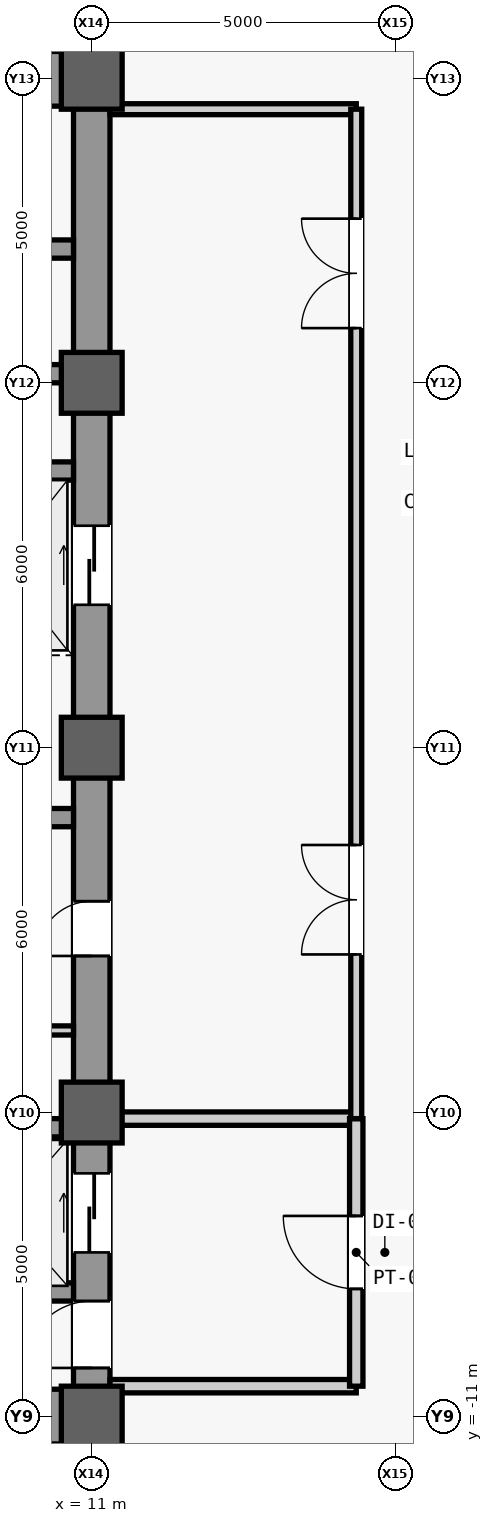
"""IFC4 building model, lengths in metres.
Left out: names, types, materials, properties, quantities, classifications, styles, units other than length and angle.
Written with IfcOpenShell. Run it as: python <this file> out.ifc"""

import sys

from ifc_helpers import new_model, si_unit, direction, frame, frame_2d, origin, origin_2d, place, context, subcontext, project, spatial, rectangle, extrude, source, transform, mapped, element, fill, save


model = new_model("IFC4")
c1 = context("Model", 3, precision=1e-05, world=origin(), true_north=direction((0.0, 1.0)))
c2 = subcontext(c1, "Body", "Model", "MODEL_VIEW")
j1 = project(units=[si_unit("LENGTHUNIT", "METRE"), si_unit("PLANEANGLEUNIT", "RADIAN")], contexts=[c1])
p1 = place(None, origin())
s1 = spatial("IfcSite", under=j1, at=p1, CompositionType="ELEMENT")
p2 = place(p1, origin())
s2 = spatial("IfcBuilding", under=s1, at=p2, CompositionType="ELEMENT")
p3 = place(p2, frame((0.0, 0.0, 70.4)))
s3 = spatial("IfcBuildingStorey", under=s2, at=p3, CompositionType="ELEMENT", Elevation=70.4)
m1 = source(origin(), c2, "Body", "SweptSolid", [
    extrude(rectangle(XDim=22.0, YDim=0.6, at=frame_2d((11.0, 0.0))), origin(), (0.0, 0.0, 1.0), 3.94),
])
p4 = place(p3, frame((11.0, -11.0, 0.0), z_axis=(0.0, 0.0, 1.0), x_axis=(0.0, 1.0, 0.0)))
e1 = element("IfcWall", 1, at=p4, inside=s3, PredefinedType="SHEAR", context=c2, shape_type="MappedRepresentation", body=[
    mapped(m1, transform((0.0, 0.0, 0.0), scale=1.0)),
])
m2 = source(origin(), c2, "Body", "SweptSolid", [
    extrude(rectangle(XDim=1.1, YDim=2.2, at=frame_2d((0.55, 1.1))), frame((0.0, 0.31, 0.0), z_axis=(0.0, -1.0, 0.0), x_axis=(1.0, 0.0, 0.0)), (0.0, 0.0, 1.0), 0.62),
])
p5 = place(p4, frame((0.8, 0.0, 0.0)))
e2 = element("IfcOpeningElement", 2, at=p5, cuts=e1, PredefinedType="OPENING", context=c2, shape_type="MappedRepresentation", body=[
    mapped(m2, transform((0.0, 0.0, 0.0), scale=1.0)),
])
m3 = source(origin(), c2, "Body", "SweptSolid", [
    extrude(rectangle(XDim=0.9, YDim=2.15, at=frame_2d((0.45, 1.075))), frame((0.0, 0.31, 0.0), z_axis=(0.0, -1.0, 0.0), x_axis=(1.0, 0.0, 0.0)), (0.0, 0.0, 1.0), 0.62),
])
p6 = place(p4, frame((7.575, 0.0, 0.0)))
e3 = element("IfcOpeningElement", 3, at=p6, cuts=e1, PredefinedType="OPENING", context=c2, shape_type="MappedRepresentation", body=[
    mapped(m3, transform((0.0, 0.0, 0.0), scale=1.0)),
])
m4 = source(origin(), c2, "Body", "SweptSolid", [
    extrude(rectangle(XDim=1.3, YDim=2.3, at=frame_2d((0.65, 1.15))), frame((0.0, 0.31, 0.0), z_axis=(0.0, -1.0, 0.0), x_axis=(1.0, 0.0, 0.0)), (0.0, 0.0, 1.0), 0.62),
])
p7 = place(p4, frame((2.7, 0.0, 0.0)))
e4 = element("IfcOpeningElement", 4, at=p7, cuts=e1, PredefinedType="OPENING", context=c2, shape_type="MappedRepresentation", body=[
    mapped(m4, transform((0.0, 0.0, 0.0), scale=1.0)),
])
p8 = place(p4, frame((13.35, 0.0, 0.0)))
e5 = element("IfcOpeningElement", 5, at=p8, cuts=e1, PredefinedType="OPENING", context=c2, shape_type="MappedRepresentation", body=[
    mapped(m4, transform((0.0, 0.0, 0.0), scale=1.0)),
])
m5 = source(origin(), c2, "Body", "SweptSolid", [
    extrude(rectangle(XDim=5.85, YDim=0.9, at=frame_2d((2.925, 0.0))), origin(), (0.0, 0.0, 1.0), 3.94),
])
p9 = place(p3, frame((4.85, -11.0, 0.0), z_axis=(0.0, 0.0, 1.0), x_axis=(1.0, 0.0, 0.0)))
e6 = element("IfcWall", 6, at=p9, inside=s3, PredefinedType="SHEAR", context=c2, shape_type="MappedRepresentation", body=[
    mapped(m5, transform((0.0, 0.0, 0.0), scale=1.0)),
])
p10 = place(p3, frame((4.85, 11.0, 0.0), z_axis=(0.0, 0.0, 1.0), x_axis=(1.0, 0.0, 0.0)))
e7 = element("IfcWall", 7, at=p10, inside=s3, PredefinedType="SHEAR", context=c2, shape_type="MappedRepresentation", body=[
    mapped(m5, transform((0.0, 0.0, 0.0), scale=1.0)),
])
m6 = source(origin(), c2, "Body", "SweptSolid", [
    extrude(rectangle(XDim=0.9, YDim=2.15, at=frame_2d((0.45, 1.075))), frame((0.0, 0.46, 0.0), z_axis=(0.0, -1.0, 0.0), x_axis=(1.0, 0.0, 0.0)), (0.0, 0.0, 1.0), 0.92),
])
p11 = place(p10, frame((0.5, 0.0, 0.0)))
e8 = element("IfcOpeningElement", 8, at=p11, cuts=e7, PredefinedType="OPENING", context=c2, shape_type="MappedRepresentation", body=[
    mapped(m6, transform((0.0, 0.0, 0.0), scale=1.0)),
])
m7 = source(origin(), c2, "Body", "SweptSolid", [
    extrude(rectangle(XDim=5.6, YDim=0.3, at=frame_2d((2.8, 0.0))), origin(), (0.0, 0.0, 1.0), 3.94),
])
p12 = place(p3, frame((5.1, -1.15, 0.0), z_axis=(0.0, 0.0, 1.0), x_axis=(1.0, 0.0, 0.0)))
e9 = element("IfcWall", 9, at=p12, inside=s3, PredefinedType="SHEAR", context=c2, shape_type="MappedRepresentation", body=[
    mapped(m7, transform((0.0, 0.0, 0.0), scale=1.0)),
])
m8 = source(origin(), c2, "Body", "SweptSolid", [
    extrude(rectangle(XDim=1.0, YDim=1.0, at=origin_2d()), origin(), (0.0, 0.0, 1.0), 4.2),
])
for number, where, z_axis, x_axis in (
    (10, (11.0, -11.0, 0.0), (0.0, 0.0, 1.0), (1.0, 0.0, 0.0)),
    (11, (11.0, -6.0, 0.0), (0.0, 0.0, 1.0), (1.0, 0.0, 0.0)),
    (12, (11.0, 0.0, 0.0), (0.0, 0.0, 1.0), (1.0, 0.0, 0.0)),
    (13, (11.0, 6.0, 0.0), (0.0, 0.0, 1.0), (1.0, 0.0, 0.0)),
    (14, (11.0, 11.0, 0.0), (0.0, 0.0, 1.0), (1.0, 0.0, 0.0)),
):
    element("IfcColumn", number, at=place(p3, frame(where, z_axis=z_axis, x_axis=x_axis)), inside=s3, PredefinedType="COLUMN", context=c2, shape_type="MappedRepresentation", body=[
        mapped(m8, transform((0.0, 0.0, 0.0), scale=1.0)),
    ])
m9 = source(origin(), c2, "Body", "SweptSolid", [
    extrude(rectangle(XDim=2.2, YDim=0.3, at=frame_2d((1.1, 0.0))), origin(), (0.0, 0.0, 1.0), 3.94),
])
for number, where, z_axis, x_axis in (
    (15, (8.5, -8.95, 0.0), (0.0, 0.0, 1.0), (1.0, 0.0, 0.0)),
    (16, (8.5, -6.25, 0.0), (0.0, 0.0, 1.0), (1.0, 0.0, 0.0)),
):
    element("IfcWall", number, at=place(p3, frame(where, z_axis=z_axis, x_axis=x_axis)), inside=s3, PredefinedType="SHEAR", context=c2, shape_type="MappedRepresentation", body=[
        mapped(m9, transform((0.0, 0.0, 0.0), scale=1.0)),
    ])
m10 = source(origin(), c2, "Body", "SweptSolid", [
    extrude(rectangle(XDim=2.3, YDim=0.3, at=frame_2d((1.15, 0.0))), origin(), (0.0, 0.0, 1.0), 3.94),
])
for number, where, z_axis, x_axis in (
    (17, (8.4, 4.55, 0.0), (0.0, 0.0, 1.0), (1.0, 0.0, 0.0)),
    (18, (8.4, 6.15, 0.0), (0.0, 0.0, 1.0), (1.0, 0.0, 0.0)),
    (19, (8.4, 8.2, 0.0), (0.0, 0.0, 1.0), (1.0, 0.0, 0.0)),
):
    element("IfcWall", number, at=place(p3, frame(where, z_axis=z_axis, x_axis=x_axis)), inside=s3, PredefinedType="SHEAR", context=c2, shape_type="MappedRepresentation", body=[
        mapped(m10, transform((0.0, 0.0, 0.0), scale=1.0)),
    ])
m11 = source(origin(), c2, "Body", "SweptSolid", [
    extrude(rectangle(XDim=2.05, YDim=0.15, at=frame_2d((1.025, 0.0))), origin(), (0.0, 0.0, 1.0), 3.94),
])
p13 = place(p3, frame((8.65, -4.65, 0.0), z_axis=(0.0, 0.0, 1.0), x_axis=(1.0, 0.0, 0.0)))
e20 = element("IfcWall", 20, at=p13, inside=s3, PredefinedType="PARTITIONING", context=c2, shape_type="MappedRepresentation", body=[
    mapped(m11, transform((0.0, 0.0, 0.0), scale=1.0)),
])
m12 = source(origin(), c2, "Body", "SweptSolid", [
    extrude(rectangle(XDim=4.05, YDim=0.22, at=frame_2d((2.025, 0.0))), origin(), (0.0, 0.0, 1.0), 3.94),
])
p14 = place(p3, frame((11.3, -10.5, 0.0), z_axis=(0.0, 0.0, 1.0), x_axis=(1.0, 0.0, 0.0)))
e21 = element("IfcWall", 21, at=p14, inside=s3, PredefinedType="PARTITIONING", context=c2, shape_type="MappedRepresentation", body=[
    mapped(m12, transform((0.0, 0.0, 0.0), scale=1.0)),
])
m13 = source(origin(), c2, "Body", "SweptSolid", [
    extrude(rectangle(XDim=4.05, YDim=0.22, at=frame_2d((2.025, 0.0))), origin(), (0.0, 0.0, 1.0), 3.085),
])
p15 = place(p3, frame((11.3, -6.1, 0.0), z_axis=(0.0, 0.0, 1.0), x_axis=(1.0, 0.0, 0.0)))
e22 = element("IfcWall", 22, at=p15, inside=s3, PredefinedType="PARTITIONING", context=c2, shape_type="MappedRepresentation", body=[
    mapped(m13, transform((0.0, 0.0, 0.0), scale=1.0)),
])
m14 = source(origin(), c2, "Body", "SweptSolid", [
    extrude(rectangle(XDim=4.4, YDim=0.22, at=frame_2d((2.2, 0.0))), origin(), (0.0, 0.0, 1.0), 3.94),
])
p16 = place(p3, frame((15.35, -10.5, 0.0), z_axis=(0.0, 0.0, 1.0), x_axis=(0.0, 1.0, 0.0)))
e23 = element("IfcWall", 23, at=p16, inside=s3, PredefinedType="PARTITIONING", context=c2, shape_type="MappedRepresentation", body=[
    mapped(m14, transform((0.0, 0.0, 0.0), scale=1.0)),
])
m15 = source(origin(), c2, "Body", "SweptSolid", [
    extrude(rectangle(XDim=1.2, YDim=2.2, at=frame_2d((0.6, 1.1))), frame((0.0, 0.12, 0.0), z_axis=(0.0, -1.0, 0.0), x_axis=(1.0, 0.0, 0.0)), (0.0, 0.0, 1.0), 0.24),
])
p17 = place(p16, frame((1.6, 0.0, 0.0)))
e24 = element("IfcOpeningElement", 24, at=p17, cuts=e23, PredefinedType="OPENING", context=c2, shape_type="MappedRepresentation", body=[
    mapped(m15, transform((0.0, 0.0, 0.0), scale=1.0)),
])
m16 = source(origin(), c2, "Body", "SweptSolid", [
    extrude(rectangle(XDim=4.05, YDim=0.18, at=frame_2d((2.025, 0.0))), origin(), (0.0, 0.0, 1.0), 3.94),
])
p18 = place(p3, frame((11.3, 10.5, 0.0), z_axis=(0.0, 0.0, 1.0), x_axis=(1.0, 0.0, 0.0)))
e25 = element("IfcWall", 25, at=p18, inside=s3, PredefinedType="PARTITIONING", context=c2, shape_type="MappedRepresentation", body=[
    mapped(m16, transform((0.0, 0.0, 0.0), scale=1.0)),
])
m17 = source(origin(), c2, "Body", "SweptSolid", [
    extrude(rectangle(XDim=16.6, YDim=0.18, at=frame_2d((8.3, 0.0))), origin(), (0.0, 0.0, 1.0), 3.94),
])
p19 = place(p3, frame((15.35, -6.1, 0.0), z_axis=(0.0, 0.0, 1.0), x_axis=(0.0, 1.0, 0.0)))
e26 = element("IfcWall", 26, at=p19, inside=s3, PredefinedType="PARTITIONING", context=c2, shape_type="MappedRepresentation", body=[
    mapped(m17, transform((0.0, 0.0, 0.0), scale=1.0)),
])
m18 = source(origin(), c2, "Body", "SweptSolid", [
    extrude(rectangle(XDim=1.8, YDim=2.25, at=frame_2d((0.9, 1.125))), frame((0.0, 0.1, 0.0), z_axis=(0.0, -1.0, 0.0), x_axis=(1.0, 0.0, 0.0)), (0.0, 0.0, 1.0), 0.2),
])
p20 = place(p19, frame((2.7, 0.0, 0.0)))
e27 = element("IfcOpeningElement", 27, at=p20, cuts=e26, PredefinedType="OPENING", context=c2, shape_type="MappedRepresentation", body=[
    mapped(m18, transform((0.0, 0.0, 0.0), scale=1.0)),
])
p21 = place(p19, frame((13.0, 0.0, 0.0)))
e28 = element("IfcOpeningElement", 28, at=p21, cuts=e26, PredefinedType="OPENING", context=c2, shape_type="MappedRepresentation", body=[
    mapped(m18, transform((0.0, 0.0, 0.0), scale=1.0)),
])
m19 = source(origin(), c2, "Body", "SweptSolid", [
    extrude(rectangle(XDim=1.1, YDim=2.2, at=frame_2d((0.55, 1.1))), frame((0.0, 0.025, 0.0), z_axis=(0.0, -1.0, 0.0), x_axis=(1.0, 0.0, 0.0)), (0.0, 0.0, 1.0), 0.05),
])
p22 = place(p5, origin())
e29 = element("IfcDoor", 29, at=p22, inside=s3, OperationType="SINGLE_SWING_LEFT", PredefinedType="DOOR", context=c2, shape_type="MappedRepresentation", body=[
    mapped(m19, transform((0.0, 0.0, 0.0), scale=1.0)),
])
fill(e2, e29)
m20 = source(origin(), c2, "Body", "SweptSolid", [
    extrude(rectangle(XDim=0.9, YDim=2.15, at=frame_2d((0.45, 1.075))), frame((0.0, 0.025, 0.0), z_axis=(0.0, -1.0, 0.0), x_axis=(1.0, 0.0, 0.0)), (0.0, 0.0, 1.0), 0.05),
])
p23 = place(p6, origin())
e30 = element("IfcDoor", 30, at=p23, inside=s3, OperationType="SINGLE_SWING_LEFT", PredefinedType="DOOR", context=c2, shape_type="MappedRepresentation", body=[
    mapped(m20, transform((0.0, 0.0, 0.0), scale=1.0)),
])
fill(e3, e30)
m21 = source(origin(), c2, "Body", "SweptSolid", [
    extrude(rectangle(XDim=1.2, YDim=2.2, at=frame_2d((0.6, 1.1))), frame((0.0, 0.025, 0.0), z_axis=(0.0, -1.0, 0.0), x_axis=(1.0, 0.0, 0.0)), (0.0, 0.0, 1.0), 0.05),
])
p24 = place(p17, origin())
e31 = element("IfcDoor", 31, at=p24, inside=s3, OperationType="SINGLE_SWING_RIGHT", PredefinedType="DOOR", context=c2, shape_type="MappedRepresentation", body=[
    mapped(m21, transform((0.0, 0.0, 0.0), scale=1.0)),
])
fill(e24, e31)
m22 = source(origin(), c2, "Body", "SweptSolid", [
    extrude(rectangle(XDim=1.8, YDim=2.25, at=frame_2d((0.9, 1.125))), frame((0.0, 0.025, 0.0), z_axis=(0.0, -1.0, 0.0), x_axis=(1.0, 0.0, 0.0)), (0.0, 0.0, 1.0), 0.05),
])
p25 = place(p20, origin())
e32 = element("IfcDoor", 32, at=p25, inside=s3, OperationType="SINGLE_SWING_RIGHT", PredefinedType="DOOR", context=c2, shape_type="MappedRepresentation", body=[
    mapped(m22, transform((0.0, 0.0, 0.0), scale=1.0)),
])
fill(e27, e32)
p26 = place(p21, origin())
e33 = element("IfcDoor", 33, at=p26, inside=s3, OperationType="SINGLE_SWING_LEFT", PredefinedType="DOOR", context=c2, shape_type="MappedRepresentation", body=[
    mapped(m22, transform((0.0, 0.0, 0.0), scale=1.0)),
])
fill(e28, e33)
m23 = source(origin(), c2, "Body", "SweptSolid", [
    extrude(rectangle(XDim=1.3, YDim=2.3, at=frame_2d((0.65, 1.15))), frame((0.0, 0.025, 0.0), z_axis=(0.0, -1.0, 0.0), x_axis=(1.0, 0.0, 0.0)), (0.0, 0.0, 1.0), 0.05),
])
p27 = place(p7, origin())
e34 = element("IfcDoor", 34, at=p27, inside=s3, OperationType="SLIDING_TO_LEFT", PredefinedType="DOOR", context=c2, shape_type="MappedRepresentation", body=[
    mapped(m23, transform((0.0, 0.0, 0.0), scale=1.0)),
])
fill(e4, e34)
p28 = place(p8, origin())
e35 = element("IfcDoor", 35, at=p28, inside=s3, OperationType="SLIDING_TO_LEFT", PredefinedType="DOOR", context=c2, shape_type="MappedRepresentation", body=[
    mapped(m23, transform((0.0, 0.0, 0.0), scale=1.0)),
])
fill(e5, e35)
save(model, sys.argv[1])
